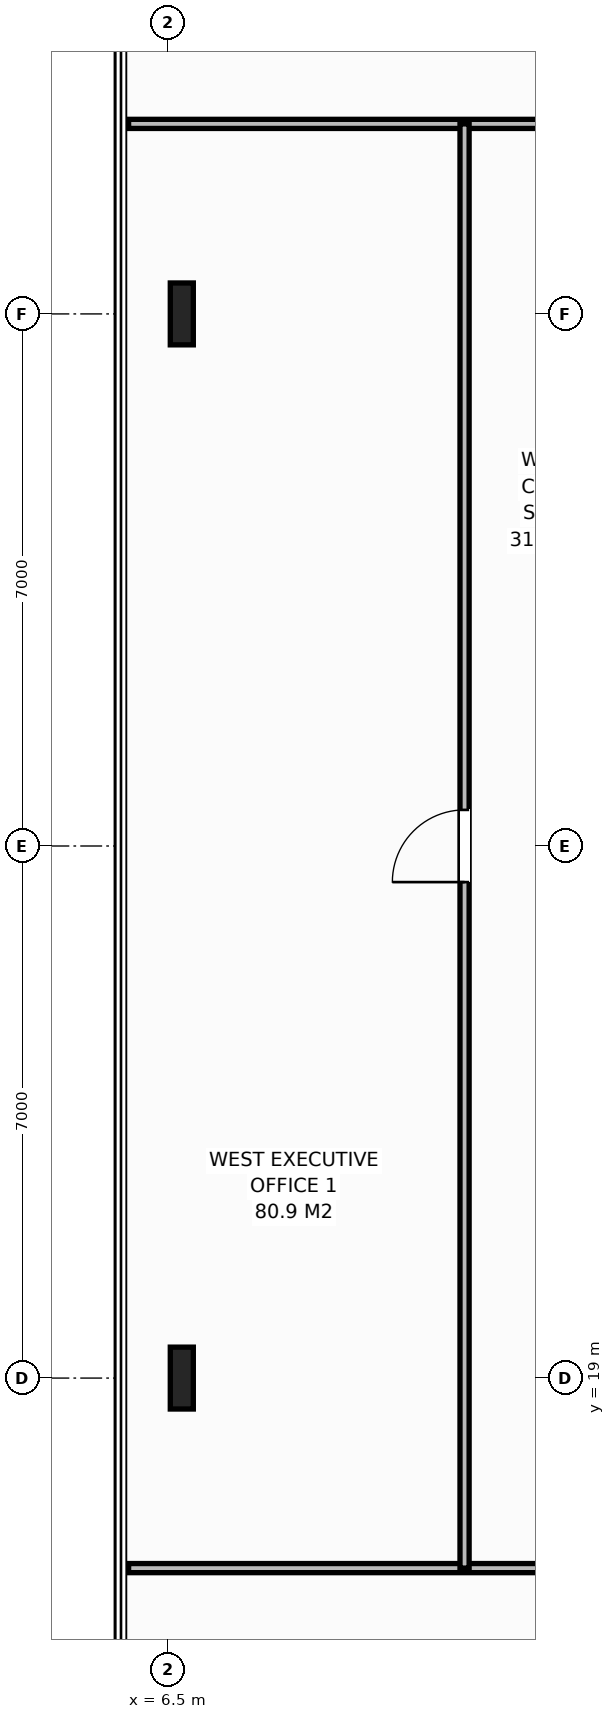
"""IFC4 building model, lengths in metres.
Left out: names, types, materials, properties, quantities, classifications, styles, units other than length and angle.
Written with IfcOpenShell. Run it as: python <this file> out.ifc"""

import sys

from ifc_helpers import new_model, si_unit, direction, frame, frame_2d, origin, origin_2d, place, context, subcontext, project, spatial, rectangle, i_section, extrude, element, fill, save


model = new_model("IFC4")
c1 = context("Model", 3, precision=1e-05, world=origin(), true_north=direction((0.0, 1.0)))
c2 = subcontext(c1, "Body", "Model", "MODEL_VIEW")
j1 = project(units=[si_unit("LENGTHUNIT", "METRE"), si_unit("PLANEANGLEUNIT", "RADIAN")], contexts=[c1])
p1 = place(None, origin())
s1 = spatial("IfcSite", under=j1, at=p1, CompositionType="ELEMENT")
p2 = place(p1, origin())
s2 = spatial("IfcBuilding", under=s1, at=p2, CompositionType="ELEMENT")
p3 = place(p2, frame((0.0, 0.0, 202.4)))
s3 = spatial("IfcBuildingStorey", under=s2, at=p3, CompositionType="ELEMENT", Elevation=202.4)
for number, where, z_axis, x_axis in (
    (1, (6.68, 19.0, 0.0), (0.0, 0.0, 1.0), (1.0, 0.0, 0.0)),
    (2, (6.68, 33.0, 0.0), (0.0, 0.0, 1.0), (1.0, 0.0, 0.0)),
):
    element("IfcColumn", number, at=place(p3, frame(where, z_axis=z_axis, x_axis=x_axis)), inside=s3, PredefinedType="COLUMN", context=c2, shape_type="SweptSolid", body=[
        extrude(i_section(OverallWidth=0.303, OverallDepth=0.814, WebThickness=0.021, FlangeThickness=0.04, at=origin_2d()), origin(), (0.0, 0.0, 1.0), 3.8),
    ])
p4 = place(p3, frame((5.98, 35.5, 0.0), z_axis=(0.0, 0.0, 1.0), x_axis=(1.0, 0.0, 0.0)))
e3 = element("IfcWall", 3, at=p4, inside=s3, PredefinedType="PARTITIONING", context=c2, shape_type="SweptSolid", body=[
    extrude(rectangle(XDim=14.569, YDim=0.12, at=frame_2d((7.284, 0.0))), origin(), (0.0, 0.0, 1.0), 3.58),
])
p5 = place(p4, frame((9.02, 0.0, 0.0)))
e4 = element("IfcOpeningElement", 4, at=p5, cuts=e3, PredefinedType="OPENING", context=c2, shape_type="SweptSolid", body=[
    extrude(rectangle(XDim=0.95, YDim=2.15, at=frame_2d((0.475, 1.075))), frame((0.0, 0.07, 0.0), z_axis=(0.0, -1.0, 0.0), x_axis=(1.0, 0.0, 0.0)), (0.0, 0.0, 1.0), 0.14),
])
p6 = place(p3, frame((5.98, 16.5, 0.0), z_axis=(0.0, 0.0, 1.0), x_axis=(1.0, 0.0, 0.0)))
e5 = element("IfcWall", 5, at=p6, inside=s3, PredefinedType="PARTITIONING", context=c2, shape_type="SweptSolid", body=[
    extrude(rectangle(XDim=13.643, YDim=0.12, at=frame_2d((6.822, 0.0))), origin(), (0.0, 0.0, 1.0), 3.58),
])
p7 = place(p6, frame((8.557, 0.0, 0.0)))
e6 = element("IfcOpeningElement", 6, at=p7, cuts=e5, PredefinedType="OPENING", context=c2, shape_type="SweptSolid", body=[
    extrude(rectangle(XDim=0.95, YDim=2.15, at=frame_2d((0.475, 1.075))), frame((0.0, 0.07, 0.0), z_axis=(0.0, -1.0, 0.0), x_axis=(1.0, 0.0, 0.0)), (0.0, 0.0, 1.0), 0.14),
])
p8 = place(p3, frame((10.4, 16.5, 0.0), z_axis=(0.0, 0.0, 1.0), x_axis=(0.0, 1.0, 0.0)))
e7 = element("IfcWall", 7, at=p8, inside=s3, PredefinedType="PARTITIONING", context=c2, shape_type="SweptSolid", body=[
    extrude(rectangle(XDim=19.0, YDim=0.12, at=frame_2d((9.5, 0.0))), origin(), (0.0, 0.0, 1.0), 3.58),
])
p9 = place(p8, frame((9.025, 0.0, 0.0)))
e8 = element("IfcOpeningElement", 8, at=p9, cuts=e7, PredefinedType="OPENING", context=c2, shape_type="SweptSolid", body=[
    extrude(rectangle(XDim=0.95, YDim=2.15, at=frame_2d((0.475, 1.075))), frame((0.0, 0.07, 0.0), z_axis=(0.0, -1.0, 0.0), x_axis=(1.0, 0.0, 0.0)), (0.0, 0.0, 1.0), 0.14),
])
p10 = place(p9, origin())
e9 = element("IfcDoor", 9, at=p10, inside=s3, OperationType="SINGLE_SWING_LEFT", PredefinedType="DOOR", context=c2, shape_type="SweptSolid", body=[
    extrude(rectangle(XDim=0.95, YDim=2.15, at=frame_2d((0.475, 1.075))), frame((0.0, 0.025, 0.0), z_axis=(0.0, -1.0, 0.0), x_axis=(1.0, 0.0, 0.0)), (0.0, 0.0, 1.0), 0.05),
])
fill(e8, e9)
save(model, sys.argv[1])
